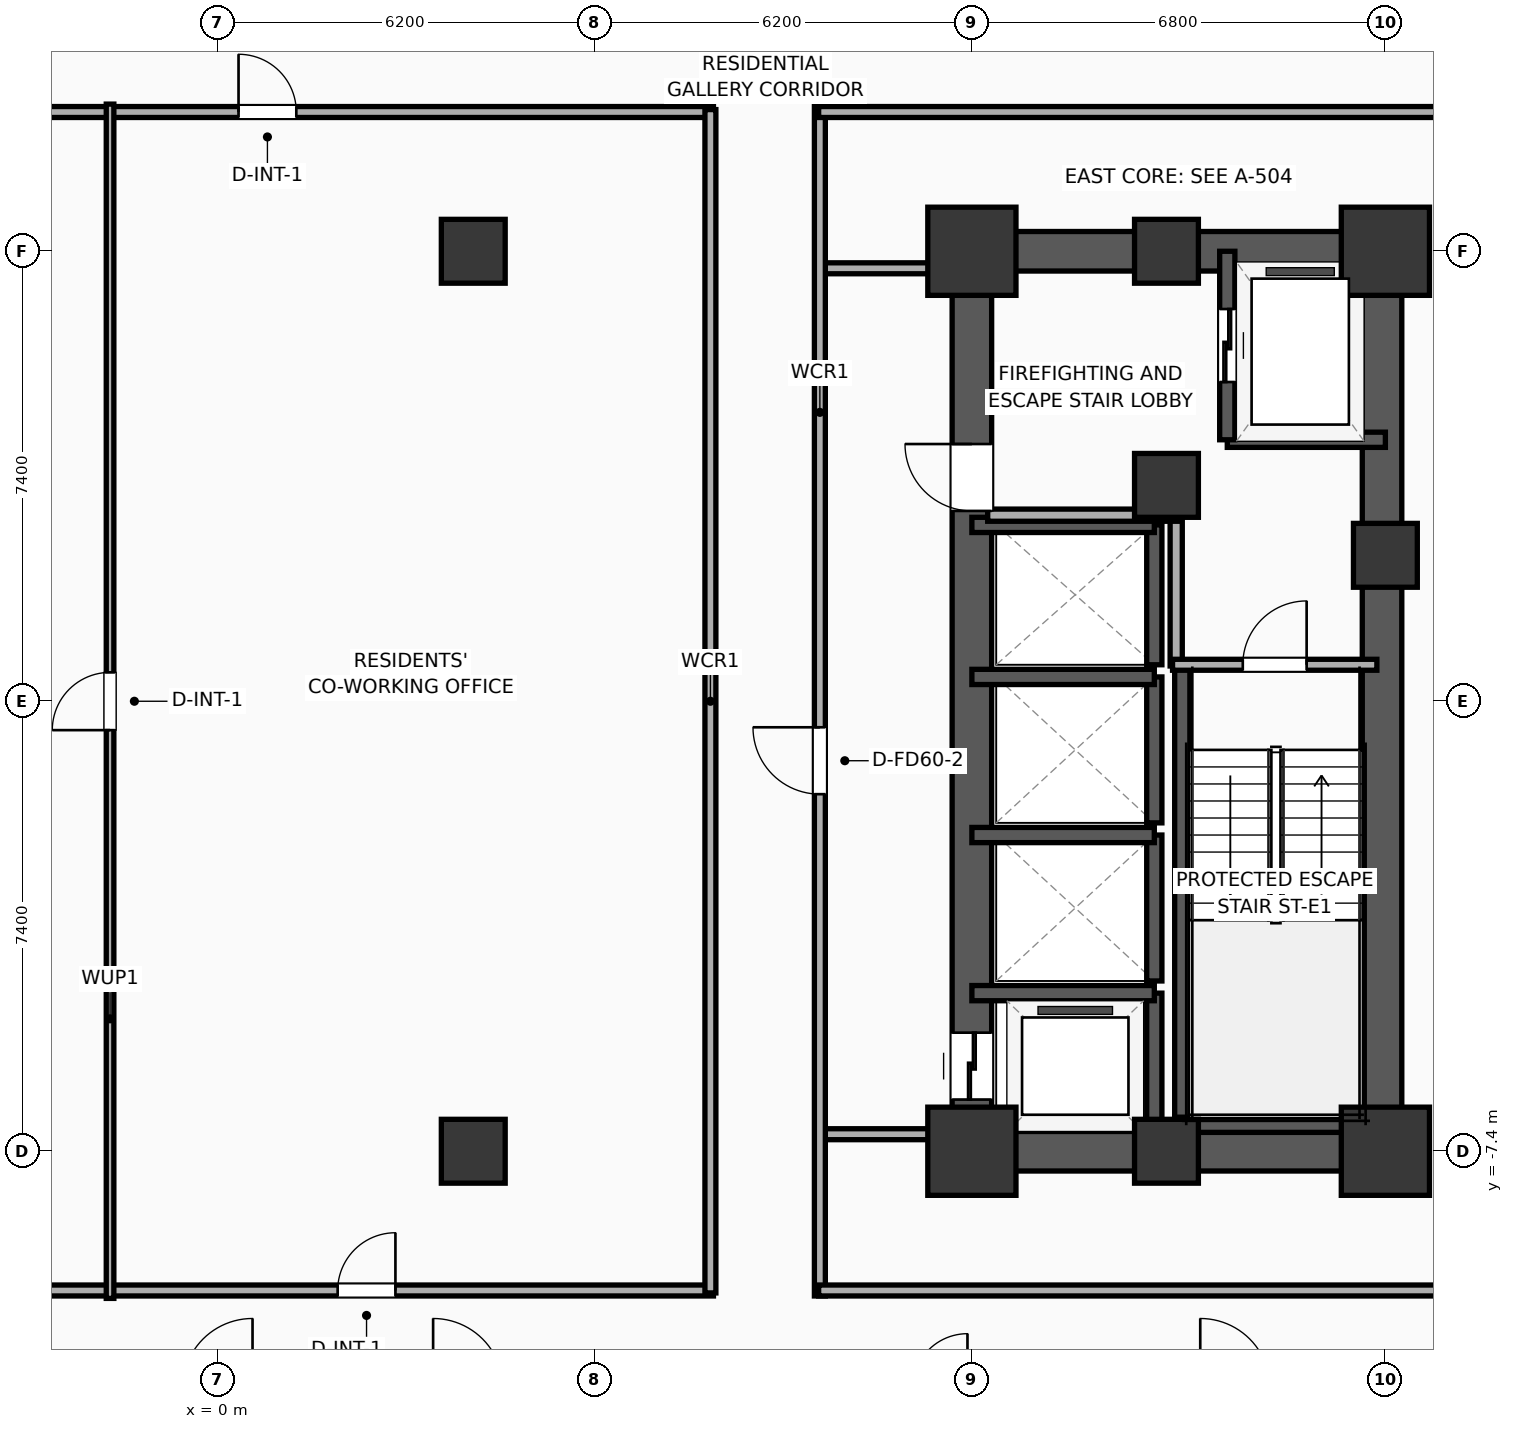
"""IFC4 building model, lengths in metres.
Left out: names, types, materials, properties, quantities, classifications, styles, units other than length and angle.
Written with IfcOpenShell. Run it as: python <this file> out.ifc"""

import sys

from ifc_helpers import new_model, si_unit, direction, frame, frame_2d, origin, origin_2d, place, context, subcontext, project, spatial, rectangle, extrude, element, fill, save


model = new_model("IFC4")
c1 = context("Model", 3, precision=1e-05, world=origin(), true_north=direction((0.0, 1.0)))
c2 = subcontext(c1, "Body", "Model", "MODEL_VIEW")
j1 = project(units=[si_unit("LENGTHUNIT", "METRE"), si_unit("PLANEANGLEUNIT", "RADIAN")], contexts=[c1])
p1 = place(None, origin())
s1 = spatial("IfcSite", under=j1, at=p1, CompositionType="ELEMENT")
p2 = place(p1, origin())
s2 = spatial("IfcBuilding", under=s1, at=p2, CompositionType="ELEMENT")
p3 = place(p2, frame((0.0, 0.0, 49.4)))
s3 = spatial("IfcBuildingStorey", under=s2, at=p3, CompositionType="ELEMENT", Elevation=49.4)
p4 = place(p3, frame((12.4, -7.4, 0.0), z_axis=(0.0, 0.0, 1.0), x_axis=(1.0, 0.0, 0.0)))
e1 = element("IfcColumn", 1, at=p4, inside=s3, PredefinedType="COLUMN", context=c2, shape_type="SweptSolid", body=[
    extrude(rectangle(XDim=1.45, YDim=1.45, at=origin_2d()), origin(), (0.0, 0.0, 1.0), 3.9),
])
p5 = place(p3, frame((15.6, 3.55, 0.0), z_axis=(0.0, 0.0, 1.0), x_axis=(1.0, 0.0, 0.0)))
e2 = element("IfcColumn", 2, at=p5, inside=s3, PredefinedType="COLUMN", context=c2, shape_type="SweptSolid", body=[
    extrude(rectangle(XDim=1.05, YDim=1.05, at=origin_2d()), origin(), (0.0, 0.0, 1.0), 3.9),
])
p6 = place(p3, frame((12.4, 7.4, 0.0), z_axis=(0.0, 0.0, 1.0), x_axis=(1.0, 0.0, 0.0)))
e3 = element("IfcColumn", 3, at=p6, inside=s3, PredefinedType="COLUMN", context=c2, shape_type="SweptSolid", body=[
    extrude(rectangle(XDim=1.45, YDim=1.45, at=origin_2d()), origin(), (0.0, 0.0, 1.0), 3.9),
])
for number, where, z_axis, x_axis in (
    (4, (15.6, -7.4, 0.0), (0.0, 0.0, 1.0), (1.0, 0.0, 0.0)),
    (5, (15.6, 7.4, 0.0), (0.0, 0.0, 1.0), (1.0, 0.0, 0.0)),
):
    element("IfcColumn", number, at=place(p3, frame(where, z_axis=z_axis, x_axis=x_axis)), inside=s3, PredefinedType="COLUMN", context=c2, shape_type="SweptSolid", body=[
        extrude(rectangle(XDim=1.05, YDim=1.05, at=origin_2d()), origin(), (0.0, 0.0, 1.0), 3.9),
    ])
p7 = place(p3, frame((19.2, -7.4, 0.0), z_axis=(0.0, 0.0, 1.0), x_axis=(1.0, 0.0, 0.0)))
e6 = element("IfcColumn", 6, at=p7, inside=s3, PredefinedType="COLUMN", context=c2, shape_type="SweptSolid", body=[
    extrude(rectangle(XDim=1.45, YDim=1.45, at=origin_2d()), origin(), (0.0, 0.0, 1.0), 3.9),
])
p8 = place(p3, frame((19.2, 2.4, 0.0), z_axis=(0.0, 0.0, 1.0), x_axis=(1.0, 0.0, 0.0)))
e7 = element("IfcColumn", 7, at=p8, inside=s3, PredefinedType="COLUMN", context=c2, shape_type="SweptSolid", body=[
    extrude(rectangle(XDim=1.05, YDim=1.05, at=origin_2d()), origin(), (0.0, 0.0, 1.0), 3.9),
])
p9 = place(p3, frame((19.2, 7.4, 0.0), z_axis=(0.0, 0.0, 1.0), x_axis=(1.0, 0.0, 0.0)))
e8 = element("IfcColumn", 8, at=p9, inside=s3, PredefinedType="COLUMN", context=c2, shape_type="SweptSolid", body=[
    extrude(rectangle(XDim=1.45, YDim=1.45, at=origin_2d()), origin(), (0.0, 0.0, 1.0), 3.9),
])
for number, where, z_axis, x_axis in (
    (9, (12.075, -7.4, 0.0), (0.0, 0.0, 1.0), (1.0, 0.0, 0.0)),
    (10, (12.075, 7.4, 0.0), (0.0, 0.0, 1.0), (1.0, 0.0, 0.0)),
):
    element("IfcWall", number, at=place(p3, frame(where, z_axis=z_axis, x_axis=x_axis)), inside=s3, PredefinedType="SHEAR", context=c2, shape_type="SweptSolid", body=[
        extrude(rectangle(XDim=7.45, YDim=0.65, at=frame_2d((3.725, 0.0))), origin(), (0.0, 0.0, 1.0), 3.65),
    ])
p10 = place(p3, frame((12.4, -7.4, 0.0), z_axis=(0.0, 0.0, 1.0), x_axis=(0.0, 1.0, 0.0)))
e11 = element("IfcWall", 11, at=p10, inside=s3, PredefinedType="SHEAR", context=c2, shape_type="SweptSolid", body=[
    extrude(rectangle(XDim=14.8, YDim=0.65, at=frame_2d((7.4, 0.0))), origin(), (0.0, 0.0, 1.0), 3.65),
])
p11 = place(p10, frame((0.85, 0.0, 0.0)))
e12 = element("IfcOpeningElement", 12, at=p11, cuts=e11, PredefinedType="OPENING", context=c2, shape_type="SweptSolid", body=[
    extrude(rectangle(XDim=1.1, YDim=2.05, at=frame_2d((0.55, 1.025))), frame((0.0, 0.335, 0.0), z_axis=(0.0, -1.0, 0.0), x_axis=(1.0, 0.0, 0.0)), (0.0, 0.0, 1.0), 0.67),
])
p12 = place(p10, frame((10.53, 0.0, 0.0)))
e13 = element("IfcOpeningElement", 13, at=p12, cuts=e11, PredefinedType="OPENING", context=c2, shape_type="SweptSolid", body=[
    extrude(rectangle(XDim=1.1, YDim=2.05, at=frame_2d((0.55, 1.025))), frame((0.0, 0.335, 0.0), z_axis=(0.0, -1.0, 0.0), x_axis=(1.0, 0.0, 0.0)), (0.0, 0.0, 1.0), 0.67),
])
p13 = place(p3, frame((19.145, -7.4, 0.0), z_axis=(0.0, 0.0, 1.0), x_axis=(0.0, 1.0, 0.0)))
e14 = element("IfcWall", 14, at=p13, inside=s3, PredefinedType="SHEAR", context=c2, shape_type="SweptSolid", body=[
    extrude(rectangle(XDim=14.8, YDim=0.65, at=frame_2d((7.4, 0.0))), origin(), (0.0, 0.0, 1.0), 3.65),
])
p14 = place(p3, frame((15.86, -7.085, 0.0), z_axis=(0.0, 0.0, 1.0), x_axis=(0.0, 1.0, 0.0)))
e15 = element("IfcWall", 15, at=p14, inside=s3, PredefinedType="SOLIDWALL", context=c2, shape_type="SweptSolid", body=[
    extrude(rectangle(XDim=7.685, YDim=0.25, at=frame_2d((3.843, 0.0))), origin(), (0.0, 0.0, 1.0), 3.65),
])
p15 = place(p3, frame((15.74, -6.965, 0.0), z_axis=(0.0, 0.0, 1.0), x_axis=(1.0, 0.0, 0.0)))
e16 = element("IfcWall", 16, at=p15, inside=s3, PredefinedType="SOLIDWALL", context=c2, shape_type="SweptSolid", body=[
    extrude(rectangle(XDim=3.46, YDim=0.25, at=frame_2d((1.73, 0.0))), origin(), (0.0, 0.0, 1.0), 3.65),
])
for number, where, z_axis, x_axis in (
    (17, (4.2, -7.4, 0.0), (0.0, 0.0, 1.0), (1.0, 0.0, 0.0)),
    (18, (4.2, 7.4, 0.0), (0.0, 0.0, 1.0), (1.0, 0.0, 0.0)),
):
    element("IfcColumn", number, at=place(p3, frame(where, z_axis=z_axis, x_axis=x_axis)), inside=s3, PredefinedType="COLUMN", context=c2, shape_type="SweptSolid", body=[
        extrude(rectangle(XDim=1.05, YDim=1.05, at=origin_2d()), origin(), (0.0, 0.0, 1.0), 3.9),
    ])
p16 = place(p3, frame((16.6, 4.3, 0.0), z_axis=(0.0, 0.0, 1.0), x_axis=(1.0, 0.0, 0.0)))
e19 = element("IfcWall", 19, at=p16, inside=s3, PredefinedType="SOLIDWALL", context=c2, shape_type="SweptSolid", body=[
    extrude(rectangle(XDim=2.6, YDim=0.25, at=frame_2d((1.3, 0.0))), origin(), (0.0, 0.0, 1.0), 3.65),
])
p17 = place(p3, frame((16.6, 7.4, 0.0), z_axis=(0.0, 0.0, 1.0), x_axis=(0.0, -1.0, 0.0)))
e20 = element("IfcWall", 20, at=p17, inside=s3, PredefinedType="SOLIDWALL", context=c2, shape_type="SweptSolid", body=[
    extrude(rectangle(XDim=3.1, YDim=0.25, at=frame_2d((1.55, 0.0))), origin(), (0.0, 0.0, 1.0), 3.65),
])
p18 = place(p17, frame((0.95, 0.0, 0.0)))
e21 = element("IfcOpeningElement", 21, at=p18, cuts=e20, PredefinedType="OPENING", context=c2, shape_type="SweptSolid", body=[
    extrude(rectangle(XDim=1.2, YDim=2.05, at=frame_2d((0.6, 1.025))), frame((0.0, 0.135, 0.0), z_axis=(0.0, -1.0, 0.0), x_axis=(1.0, 0.0, 0.0)), (0.0, 0.0, 1.0), 0.27),
])
p19 = place(p3, frame((15.4, -7.4, 0.0), z_axis=(0.0, 0.0, 1.0), x_axis=(0.0, 1.0, 0.0)))
e22 = element("IfcWall", 22, at=p19, inside=s3, PredefinedType="SOLIDWALL", context=c2, shape_type="SweptSolid", body=[
    extrude(rectangle(XDim=2.6, YDim=0.25, at=frame_2d((1.3, 0.0))), origin(), (0.0, 0.0, 1.0), 3.65),
])
p20 = place(p3, frame((15.4, -4.8, 0.0), z_axis=(0.0, 0.0, 1.0), x_axis=(-1.0, 0.0, 0.0)))
e23 = element("IfcWall", 23, at=p20, inside=s3, PredefinedType="SOLIDWALL", context=c2, shape_type="SweptSolid", body=[
    extrude(rectangle(XDim=3.0, YDim=0.25, at=frame_2d((1.5, 0.0))), origin(), (0.0, 0.0, 1.0), 3.65),
])
p21 = place(p3, frame((15.4, -4.6, 0.0), z_axis=(0.0, 0.0, 1.0), x_axis=(0.0, 1.0, 0.0)))
e24 = element("IfcWall", 24, at=p21, inside=s3, PredefinedType="SOLIDWALL", context=c2, shape_type="SweptSolid", body=[
    extrude(rectangle(XDim=2.4, YDim=0.25, at=frame_2d((1.2, 0.0))), origin(), (0.0, 0.0, 1.0), 3.65),
])
p22 = place(p3, frame((15.4, -2.2, 0.0), z_axis=(0.0, 0.0, 1.0), x_axis=(-1.0, 0.0, 0.0)))
e25 = element("IfcWall", 25, at=p22, inside=s3, PredefinedType="SOLIDWALL", context=c2, shape_type="SweptSolid", body=[
    extrude(rectangle(XDim=3.0, YDim=0.25, at=frame_2d((1.5, 0.0))), origin(), (0.0, 0.0, 1.0), 3.65),
])
p23 = place(p3, frame((15.4, -2.0, 0.0), z_axis=(0.0, 0.0, 1.0), x_axis=(0.0, 1.0, 0.0)))
e26 = element("IfcWall", 26, at=p23, inside=s3, PredefinedType="SOLIDWALL", context=c2, shape_type="SweptSolid", body=[
    extrude(rectangle(XDim=2.4, YDim=0.25, at=frame_2d((1.2, 0.0))), origin(), (0.0, 0.0, 1.0), 3.65),
])
p24 = place(p3, frame((15.4, 0.4, 0.0), z_axis=(0.0, 0.0, 1.0), x_axis=(-1.0, 0.0, 0.0)))
e27 = element("IfcWall", 27, at=p24, inside=s3, PredefinedType="SOLIDWALL", context=c2, shape_type="SweptSolid", body=[
    extrude(rectangle(XDim=3.0, YDim=0.25, at=frame_2d((1.5, 0.0))), origin(), (0.0, 0.0, 1.0), 3.65),
])
p25 = place(p3, frame((15.4, 0.6, 0.0), z_axis=(0.0, 0.0, 1.0), x_axis=(0.0, 1.0, 0.0)))
e28 = element("IfcWall", 28, at=p25, inside=s3, PredefinedType="SOLIDWALL", context=c2, shape_type="SweptSolid", body=[
    extrude(rectangle(XDim=2.3, YDim=0.25, at=frame_2d((1.15, 0.0))), origin(), (0.0, 0.0, 1.0), 3.65),
])
p26 = place(p3, frame((15.4, 2.9, 0.0), z_axis=(0.0, 0.0, 1.0), x_axis=(-1.0, 0.0, 0.0)))
e29 = element("IfcWall", 29, at=p26, inside=s3, PredefinedType="SOLIDWALL", context=c2, shape_type="SweptSolid", body=[
    extrude(rectangle(XDim=3.0, YDim=0.25, at=frame_2d((1.5, 0.0))), origin(), (0.0, 0.0, 1.0), 3.65),
])
p27 = place(p3, frame((15.76, 0.58, 0.0), z_axis=(0.0, 0.0, 1.0), x_axis=(0.0, 1.0, 0.0)))
e30 = element("IfcWall", 30, at=p27, inside=s3, PredefinedType="PARTITIONING", context=c2, shape_type="SweptSolid", body=[
    extrude(rectangle(XDim=2.52, YDim=0.2, at=frame_2d((1.26, 0.0))), origin(), (0.0, 0.0, 1.0), 3.65),
])
p28 = place(p3, frame((12.66, 3.06, 0.0), z_axis=(0.0, 0.0, 1.0), x_axis=(1.0, 0.0, 0.0)))
e31 = element("IfcWall", 31, at=p28, inside=s3, PredefinedType="PARTITIONING", context=c2, shape_type="SweptSolid", body=[
    extrude(rectangle(XDim=3.16, YDim=0.2, at=frame_2d((1.58, 0.0))), origin(), (0.0, 0.0, 1.0), 3.65),
])
p29 = place(p3, frame((15.7, 0.6, 0.0), z_axis=(0.0, 0.0, 1.0), x_axis=(1.0, 0.0, 0.0)))
e32 = element("IfcWall", 32, at=p29, inside=s3, PredefinedType="PARTITIONING", context=c2, shape_type="SweptSolid", body=[
    extrude(rectangle(XDim=3.36, YDim=0.18, at=frame_2d((1.68, 0.0))), origin(), (0.0, 0.0, 1.0), 3.65),
])
p30 = place(p29, frame((1.155, 0.0, 0.0)))
e33 = element("IfcOpeningElement", 33, at=p30, cuts=e32, PredefinedType="OPENING", context=c2, shape_type="SweptSolid", body=[
    extrude(rectangle(XDim=1.05, YDim=2.05, at=frame_2d((0.525, 1.025))), frame((0.0, 0.1, 0.0), z_axis=(0.0, -1.0, 0.0), x_axis=(1.0, 0.0, 0.0)), (0.0, 0.0, 1.0), 0.2),
])
for number, where, z_axis, x_axis in (
    (34, (9.88, 7.12, 0.0), (0.0, 0.0, 1.0), (1.0, 0.0, 0.0)),
    (35, (9.88, -7.12, 0.0), (0.0, 0.0, 1.0), (1.0, 0.0, 0.0)),
):
    element("IfcWall", number, at=place(p3, frame(where, z_axis=z_axis, x_axis=x_axis)), inside=s3, PredefinedType="PARTITIONING", context=c2, shape_type="SweptSolid", body=[
        extrude(rectangle(XDim=2.27, YDim=0.18, at=frame_2d((1.135, 0.0))), origin(), (0.0, 0.0, 1.0), 2.94),
    ])
p31 = place(p3, frame((9.9, -9.78, 0.0), z_axis=(0.0, 0.0, 1.0), x_axis=(0.0, 1.0, 0.0)))
e36 = element("IfcWall", 36, at=p31, inside=s3, PredefinedType="PARTITIONING", context=c2, shape_type="SweptSolid", body=[
    extrude(rectangle(XDim=19.56, YDim=0.18, at=frame_2d((9.78, 0.0))), origin(), (0.0, 0.0, 1.0), 3.65),
])
p32 = place(p31, frame((8.252, 0.0, 0.0)))
e37 = element("IfcOpeningElement", 37, at=p32, cuts=e36, PredefinedType="OPENING", context=c2, shape_type="SweptSolid", body=[
    extrude(rectangle(XDim=1.1, YDim=2.05, at=frame_2d((0.55, 1.025))), frame((0.0, 0.1, 0.0), z_axis=(0.0, -1.0, 0.0), x_axis=(1.0, 0.0, 0.0)), (0.0, 0.0, 1.0), 0.2),
])
p33 = place(p3, frame((9.88, 9.69, 0.0), z_axis=(0.0, 0.0, 1.0), x_axis=(1.0, 0.0, 0.0)))
e38 = element("IfcWall", 38, at=p33, inside=s3, PredefinedType="PARTITIONING", context=c2, shape_type="SweptSolid", body=[
    extrude(rectangle(XDim=16.33, YDim=0.18, at=frame_2d((8.165, 0.0))), origin(), (0.0, 0.0, 1.0), 3.65),
])
p34 = place(p33, frame((14.316, 0.0, 0.0)))
e39 = element("IfcOpeningElement", 39, at=p34, cuts=e38, PredefinedType="OPENING", context=c2, shape_type="SweptSolid", body=[
    extrude(rectangle(XDim=0.9, YDim=2.05, at=frame_2d((0.45, 1.025))), frame((0.0, 0.1, 0.0), z_axis=(0.0, -1.0, 0.0), x_axis=(1.0, 0.0, 0.0)), (0.0, 0.0, 1.0), 0.2),
])
p35 = place(p3, frame((9.88, -9.69, 0.0), z_axis=(0.0, 0.0, 1.0), x_axis=(1.0, 0.0, 0.0)))
e40 = element("IfcWall", 40, at=p35, inside=s3, PredefinedType="PARTITIONING", context=c2, shape_type="SweptSolid", body=[
    extrude(rectangle(XDim=16.33, YDim=0.18, at=frame_2d((8.165, 0.0))), origin(), (0.0, 0.0, 1.0), 3.65),
])
p36 = place(p3, frame((-8.15, 9.69, 0.0), z_axis=(0.0, 0.0, 1.0), x_axis=(1.0, 0.0, 0.0)))
e41 = element("IfcWall", 41, at=p36, inside=s3, PredefinedType="PARTITIONING", context=c2, shape_type="SweptSolid", body=[
    extrude(rectangle(XDim=16.3, YDim=0.18, at=frame_2d((8.15, 0.0))), origin(), (0.0, 0.0, 1.0), 3.65),
])
p37 = place(p36, frame((8.49, 0.0, 0.0)))
e42 = element("IfcOpeningElement", 42, at=p37, cuts=e41, PredefinedType="OPENING", context=c2, shape_type="SweptSolid", body=[
    extrude(rectangle(XDim=0.95, YDim=2.05, at=frame_2d((0.475, 1.025))), frame((0.0, 0.1, 0.0), z_axis=(0.0, -1.0, 0.0), x_axis=(1.0, 0.0, 0.0)), (0.0, 0.0, 1.0), 0.2),
])
p38 = place(p3, frame((-8.15, -9.69, 0.0), z_axis=(0.0, 0.0, 1.0), x_axis=(1.0, 0.0, 0.0)))
e43 = element("IfcWall", 43, at=p38, inside=s3, PredefinedType="PARTITIONING", context=c2, shape_type="SweptSolid", body=[
    extrude(rectangle(XDim=16.3, YDim=0.18, at=frame_2d((8.15, 0.0))), origin(), (0.0, 0.0, 1.0), 3.65),
])
p39 = place(p38, frame((1.13, 0.0, 0.0)))
e44 = element("IfcOpeningElement", 44, at=p39, cuts=e43, PredefinedType="OPENING", context=c2, shape_type="SweptSolid", body=[
    extrude(rectangle(XDim=1.0, YDim=2.05, at=frame_2d((0.5, 1.025))), frame((0.0, 0.1, 0.0), z_axis=(0.0, -1.0, 0.0), x_axis=(1.0, 0.0, 0.0)), (0.0, 0.0, 1.0), 0.2),
])
p40 = place(p38, frame((10.12, 0.0, 0.0)))
e45 = element("IfcOpeningElement", 45, at=p40, cuts=e43, PredefinedType="OPENING", context=c2, shape_type="SweptSolid", body=[
    extrude(rectangle(XDim=0.95, YDim=2.05, at=frame_2d((0.475, 1.025))), frame((0.0, 0.1, 0.0), z_axis=(0.0, -1.0, 0.0), x_axis=(1.0, 0.0, 0.0)), (0.0, 0.0, 1.0), 0.2),
])
p41 = place(p3, frame((8.1, -9.73, 0.0), z_axis=(0.0, 0.0, 1.0), x_axis=(0.0, 1.0, 0.0)))
e46 = element("IfcWall", 46, at=p41, inside=s3, PredefinedType="PARTITIONING", context=c2, shape_type="SweptSolid", body=[
    extrude(rectangle(XDim=19.46, YDim=0.18, at=frame_2d((9.73, 0.0))), origin(), (0.0, 0.0, 1.0), 3.65),
])
p42 = place(p3, frame((-1.773, -9.82, 0.0), z_axis=(0.0, 0.0, 1.0), x_axis=(0.0, 1.0, 0.0)))
e47 = element("IfcWall", 47, at=p42, inside=s3, PredefinedType="PARTITIONING", context=c2, shape_type="SweptSolid", body=[
    extrude(rectangle(XDim=19.64, YDim=0.125, at=frame_2d((9.82, 0.0))), origin(), (0.0, 0.0, 1.0), 3.65),
])
p43 = place(p42, frame((9.345, 0.0, 0.0)))
e48 = element("IfcOpeningElement", 48, at=p43, cuts=e47, PredefinedType="OPENING", context=c2, shape_type="SweptSolid", body=[
    extrude(rectangle(XDim=0.95, YDim=2.05, at=frame_2d((0.475, 1.025))), frame((0.0, 0.073, 0.0), z_axis=(0.0, -1.0, 0.0), x_axis=(1.0, 0.0, 0.0)), (0.0, 0.0, 1.0), 0.145),
])
p44 = place(p18, origin())
e49 = element("IfcDoor", 49, at=p44, inside=s3, OperationType="SLIDING_TO_LEFT", PredefinedType="DOOR", context=c2, shape_type="SweptSolid", body=[
    extrude(rectangle(XDim=1.2, YDim=2.05, at=frame_2d((0.6, 1.025))), frame((0.0, 0.025, 0.0), z_axis=(0.0, -1.0, 0.0), x_axis=(1.0, 0.0, 0.0)), (0.0, 0.0, 1.0), 0.05),
])
fill(e21, e49)
p45 = place(p11, origin())
e50 = element("IfcDoor", 50, at=p45, inside=s3, OperationType="SLIDING_TO_LEFT", PredefinedType="DOOR", context=c2, shape_type="SweptSolid", body=[
    extrude(rectangle(XDim=1.1, YDim=2.05, at=frame_2d((0.55, 1.025))), frame((0.0, 0.025, 0.0), z_axis=(0.0, -1.0, 0.0), x_axis=(1.0, 0.0, 0.0)), (0.0, 0.0, 1.0), 0.05),
])
fill(e12, e50)
p46 = place(p30, origin())
e51 = element("IfcDoor", 51, at=p46, inside=s3, OperationType="SINGLE_SWING_RIGHT", PredefinedType="DOOR", context=c2, shape_type="SweptSolid", body=[
    extrude(rectangle(XDim=1.05, YDim=2.05, at=frame_2d((0.525, 1.025))), frame((0.0, 0.025, 0.0), z_axis=(0.0, -1.0, 0.0), x_axis=(1.0, 0.0, 0.0)), (0.0, 0.0, 1.0), 0.05),
])
fill(e33, e51)
p47 = place(p32, origin())
e52 = element("IfcDoor", 52, at=p47, inside=s3, OperationType="SINGLE_SWING_RIGHT", PredefinedType="DOOR", context=c2, shape_type="SweptSolid", body=[
    extrude(rectangle(XDim=1.1, YDim=2.05, at=frame_2d((0.55, 1.025))), frame((0.0, 0.025, 0.0), z_axis=(0.0, -1.0, 0.0), x_axis=(1.0, 0.0, 0.0)), (0.0, 0.0, 1.0), 0.05),
])
fill(e37, e52)
p48 = place(p37, origin())
e53 = element("IfcDoor", 53, at=p48, inside=s3, OperationType="SINGLE_SWING_LEFT", PredefinedType="DOOR", context=c2, shape_type="SweptSolid", body=[
    extrude(rectangle(XDim=0.95, YDim=2.05, at=frame_2d((0.475, 1.025))), frame((0.0, 0.025, 0.0), z_axis=(0.0, -1.0, 0.0), x_axis=(1.0, 0.0, 0.0)), (0.0, 0.0, 1.0), 0.05),
])
fill(e42, e53)
p49 = place(p40, origin())
e54 = element("IfcDoor", 54, at=p49, inside=s3, OperationType="SINGLE_SWING_RIGHT", PredefinedType="DOOR", context=c2, shape_type="SweptSolid", body=[
    extrude(rectangle(XDim=0.95, YDim=2.05, at=frame_2d((0.475, 1.025))), frame((0.0, 0.025, 0.0), z_axis=(0.0, -1.0, 0.0), x_axis=(1.0, 0.0, 0.0)), (0.0, 0.0, 1.0), 0.05),
])
fill(e45, e54)
p50 = place(p43, origin())
e55 = element("IfcDoor", 55, at=p50, inside=s3, OperationType="SINGLE_SWING_LEFT", PredefinedType="DOOR", context=c2, shape_type="SweptSolid", body=[
    extrude(rectangle(XDim=0.95, YDim=2.05, at=frame_2d((0.475, 1.025))), frame((0.0, 0.025, 0.0), z_axis=(0.0, -1.0, 0.0), x_axis=(1.0, 0.0, 0.0)), (0.0, 0.0, 1.0), 0.05),
])
fill(e48, e55)
p51 = place(p12, origin())
e56 = element("IfcDoor", 56, at=p51, inside=s3, OperationType="SINGLE_SWING_RIGHT", PredefinedType="DOOR", context=c2, shape_type="SweptSolid", body=[
    extrude(rectangle(XDim=1.1, YDim=2.05, at=frame_2d((0.55, 1.025))), frame((0.0, 0.025, 0.0), z_axis=(0.0, -1.0, 0.0), x_axis=(1.0, 0.0, 0.0)), (0.0, 0.0, 1.0), 0.05),
])
fill(e13, e56)
save(model, sys.argv[1])
